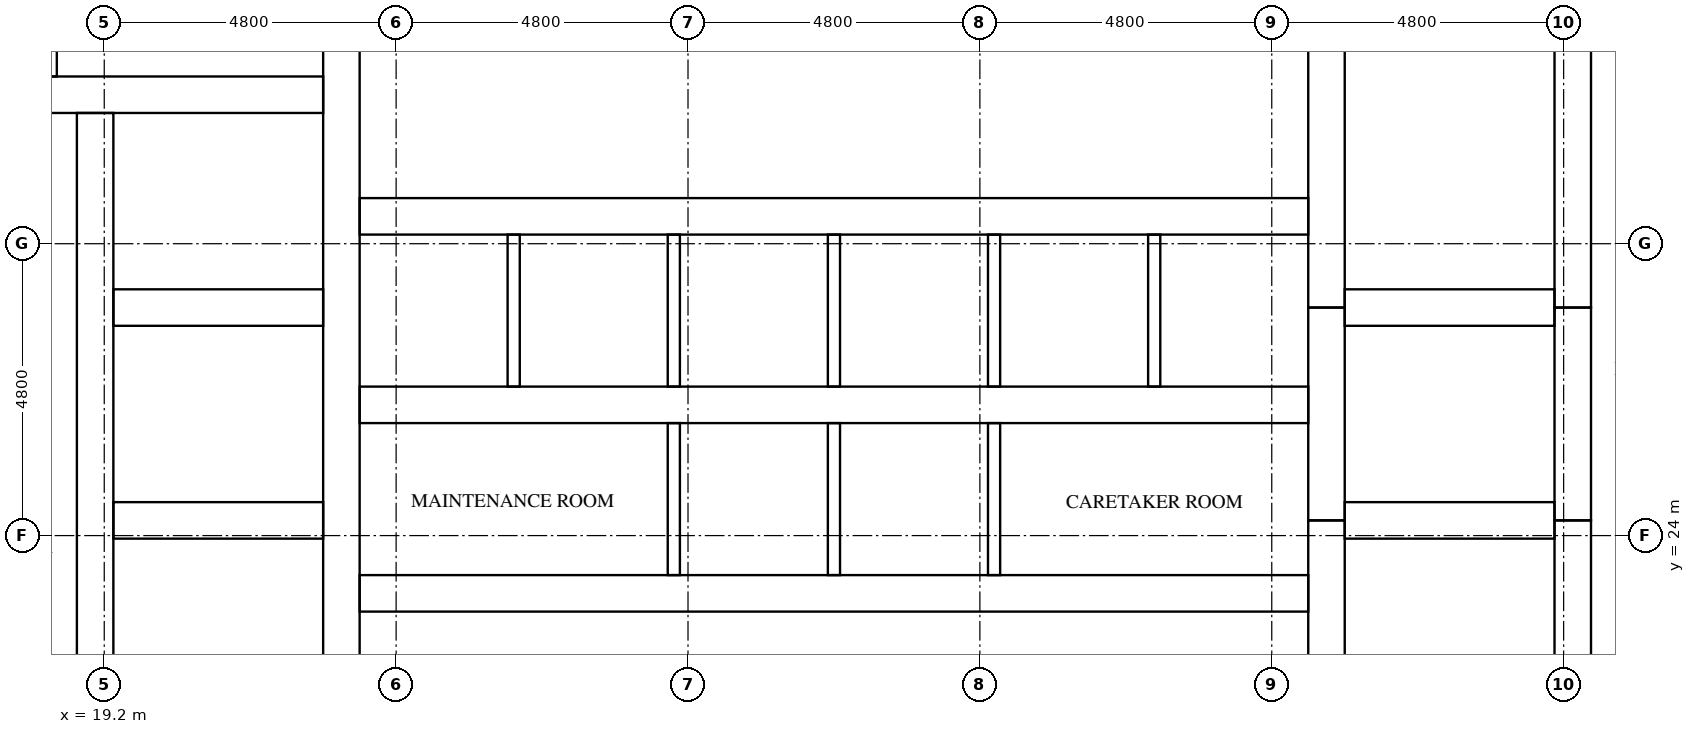
"""IFC4 building model, lengths in metres.
Left out: names, types, materials, properties, quantities, classifications, styles, units other than length and angle.
Written with IfcOpenShell. Run it as: python <this file> out.ifc"""

import sys

from ifc_helpers import new_model, si_unit, direction, frame, frame_2d, origin, place, context, subcontext, project, spatial, rectangle, extrude, element, fill, save


model = new_model("IFC4")
c1 = context("Model", 3, precision=1e-05, world=origin(), true_north=direction((0.0, 1.0)))
c2 = subcontext(c1, "Body", "Model", "MODEL_VIEW")
j1 = project(units=[si_unit("LENGTHUNIT", "METRE"), si_unit("PLANEANGLEUNIT", "RADIAN")], contexts=[c1])
p1 = place(None, origin())
s1 = spatial("IfcSite", under=j1, at=p1, CompositionType="ELEMENT")
p2 = place(p1, origin())
s2 = spatial("IfcBuilding", under=s1, at=p2, CompositionType="ELEMENT")
p3 = place(p2, frame((0.0, 0.0, 152.5)))
s3 = spatial("IfcBuildingStorey", under=s2, at=p3, CompositionType="ELEMENT", Elevation=152.5)
p4 = place(p3, frame((19.05, 15.8, 0.0), z_axis=(0.0, 0.0, 1.0), x_axis=(0.0, 1.0, 0.0)))
e1 = element("IfcWall", 1, at=p4, inside=s3, PredefinedType="SHEAR", context=c2, shape_type="SweptSolid", body=[
    extrude(rectangle(XDim=15.15, YDim=0.6, at=frame_2d((7.575, 0.0))), origin(), (0.0, 0.0, 1.0), 3.2),
])
p5 = place(p4, frame((9.65, 0.0, 0.0)))
e2 = element("IfcOpeningElement", 2, at=p5, cuts=e1, PredefinedType="OPENING", context=c2, shape_type="SweptSolid", body=[
    extrude(rectangle(XDim=1.1, YDim=2.1, at=frame_2d((0.55, 1.05))), frame((0.0, 0.31, 0.0), z_axis=(0.0, -1.0, 0.0), x_axis=(1.0, 0.0, 0.0)), (0.0, 0.0, 1.0), 0.62),
])
p6 = place(p4, frame((13.15, 0.0, 0.0)))
e3 = element("IfcOpeningElement", 3, at=p6, cuts=e1, PredefinedType="OPENING", context=c2, shape_type="SweptSolid", body=[
    extrude(rectangle(XDim=1.1, YDim=2.1, at=frame_2d((0.55, 1.05))), frame((0.0, 0.31, 0.0), z_axis=(0.0, -1.0, 0.0), x_axis=(1.0, 0.0, 0.0)), (0.0, 0.0, 1.0), 0.62),
])
p7 = place(p4, frame((0.4, 0.0, 0.0)))
e4 = element("IfcOpeningElement", 4, at=p7, cuts=e1, PredefinedType="OPENING", context=c2, shape_type="SweptSolid", body=[
    extrude(rectangle(XDim=1.2, YDim=2.1, at=frame_2d((0.6, 1.05))), frame((0.0, 0.31, 0.0), z_axis=(0.0, -1.0, 0.0), x_axis=(1.0, 0.0, 0.0)), (0.0, 0.0, 1.0), 0.62),
])
p8 = place(p3, frame((23.1, 15.8, 0.0), z_axis=(0.0, 0.0, 1.0), x_axis=(0.0, 1.0, 0.0)))
e5 = element("IfcWall", 5, at=p8, inside=s3, PredefinedType="SHEAR", context=c2, shape_type="SweptSolid", body=[
    extrude(rectangle(XDim=21.2, YDim=0.6, at=frame_2d((10.6, 0.0))), origin(), (0.0, 0.0, 1.0), 3.2),
])
p9 = place(p3, frame((39.3, 15.8, 0.0), z_axis=(0.0, 0.0, 1.0), x_axis=(0.0, 1.0, 0.0)))
e6 = element("IfcWall", 6, at=p9, inside=s3, PredefinedType="SHEAR", context=c2, shape_type="SweptSolid", body=[
    extrude(rectangle(XDim=8.45, YDim=0.6, at=frame_2d((4.225, 0.0))), origin(), (0.0, 0.0, 1.0), 3.2),
])
p10 = place(p3, frame((39.3, 24.25, 0.0), z_axis=(0.0, 0.0, 1.0), x_axis=(0.0, 1.0, 0.0)))
e7 = element("IfcWall", 7, at=p10, inside=s3, PredefinedType="SHEAR", context=c2, shape_type="SweptSolid", body=[
    extrude(rectangle(XDim=3.5, YDim=0.6, at=frame_2d((1.75, 0.0))), origin(), (0.0, 0.0, 1.0), 3.2),
])
p11 = place(p3, frame((39.3, 27.75, 0.0), z_axis=(0.0, 0.0, 1.0), x_axis=(0.0, 1.0, 0.0)))
e8 = element("IfcWall", 8, at=p11, inside=s3, PredefinedType="SHEAR", context=c2, shape_type="SweptSolid", body=[
    extrude(rectangle(XDim=9.25, YDim=0.6, at=frame_2d((4.625, 0.0))), origin(), (0.0, 0.0, 1.0), 3.2),
])
p12 = place(p3, frame((43.35, 15.8, 0.0), z_axis=(0.0, 0.0, 1.0), x_axis=(0.0, 1.0, 0.0)))
e9 = element("IfcWall", 9, at=p12, inside=s3, PredefinedType="SHEAR", context=c2, shape_type="SweptSolid", body=[
    extrude(rectangle(XDim=8.45, YDim=0.6, at=frame_2d((4.225, 0.0))), origin(), (0.0, 0.0, 1.0), 3.2),
])
p13 = place(p12, frame((0.4, 0.0, 0.0)))
e10 = element("IfcOpeningElement", 10, at=p13, cuts=e9, PredefinedType="OPENING", context=c2, shape_type="SweptSolid", body=[
    extrude(rectangle(XDim=1.2, YDim=2.1, at=frame_2d((0.6, 1.05))), frame((0.0, 0.31, 0.0), z_axis=(0.0, -1.0, 0.0), x_axis=(1.0, 0.0, 0.0)), (0.0, 0.0, 1.0), 0.62),
])
p14 = place(p3, frame((43.35, 24.25, 0.0), z_axis=(0.0, 0.0, 1.0), x_axis=(0.0, 1.0, 0.0)))
e11 = element("IfcWall", 11, at=p14, inside=s3, PredefinedType="SHEAR", context=c2, shape_type="SweptSolid", body=[
    extrude(rectangle(XDim=3.5, YDim=0.6, at=frame_2d((1.75, 0.0))), origin(), (0.0, 0.0, 1.0), 3.2),
])
p15 = place(p14, frame((1.2, 0.0, 0.0)))
e12 = element("IfcOpeningElement", 12, at=p15, cuts=e11, PredefinedType="OPENING", context=c2, shape_type="SweptSolid", body=[
    extrude(rectangle(XDim=1.1, YDim=2.1, at=frame_2d((0.55, 1.05))), frame((0.0, 0.31, 0.0), z_axis=(0.0, -1.0, 0.0), x_axis=(1.0, 0.0, 0.0)), (0.0, 0.0, 1.0), 0.62),
])
p16 = place(p3, frame((43.35, 27.75, 0.0), z_axis=(0.0, 0.0, 1.0), x_axis=(0.0, 1.0, 0.0)))
e13 = element("IfcWall", 13, at=p16, inside=s3, PredefinedType="SHEAR", context=c2, shape_type="SweptSolid", body=[
    extrude(rectangle(XDim=9.25, YDim=0.6, at=frame_2d((4.625, 0.0))), origin(), (0.0, 0.0, 1.0), 3.2),
])
p17 = place(p16, frame((7.65, 0.0, 0.0)))
e14 = element("IfcOpeningElement", 14, at=p17, cuts=e13, PredefinedType="OPENING", context=c2, shape_type="SweptSolid", body=[
    extrude(rectangle(XDim=1.2, YDim=2.1, at=frame_2d((0.6, 1.05))), frame((0.0, 0.31, 0.0), z_axis=(0.0, -1.0, 0.0), x_axis=(1.0, 0.0, 0.0)), (0.0, 0.0, 1.0), 0.62),
])
for number, where, z_axis, x_axis in (
    (15, (19.35, 24.25, 0.0), (0.0, 0.0, 1.0), (1.0, 0.0, 0.0)),
    (16, (19.35, 27.75, 0.0), (0.0, 0.0, 1.0), (1.0, 0.0, 0.0)),
):
    element("IfcWall", number, at=place(p3, frame(where, z_axis=z_axis, x_axis=x_axis)), inside=s3, PredefinedType="SHEAR", context=c2, shape_type="SweptSolid", body=[
        extrude(rectangle(XDim=3.45, YDim=0.6, at=frame_2d((1.725, 0.0))), origin(), (0.0, 0.0, 1.0), 3.2),
    ])
p18 = place(p3, frame((15.8, 31.25, 0.0), z_axis=(0.0, 0.0, 1.0), x_axis=(1.0, 0.0, 0.0)))
e17 = element("IfcWall", 17, at=p18, inside=s3, PredefinedType="SHEAR", context=c2, shape_type="SweptSolid", body=[
    extrude(rectangle(XDim=7.0, YDim=0.6, at=frame_2d((3.5, 0.0))), origin(), (0.0, 0.0, 1.0), 3.2),
])
for number, where, z_axis, x_axis in (
    (18, (39.6, 24.25, 0.0), (0.0, 0.0, 1.0), (1.0, 0.0, 0.0)),
    (19, (39.6, 27.75, 0.0), (0.0, 0.0, 1.0), (1.0, 0.0, 0.0)),
):
    element("IfcWall", number, at=place(p3, frame(where, z_axis=z_axis, x_axis=x_axis)), inside=s3, PredefinedType="SHEAR", context=c2, shape_type="SweptSolid", body=[
        extrude(rectangle(XDim=3.45, YDim=0.6, at=frame_2d((1.725, 0.0))), origin(), (0.0, 0.0, 1.0), 3.2),
    ])
p19 = place(p3, frame((23.4, 23.05, 0.0), z_axis=(0.0, 0.0, 1.0), x_axis=(1.0, 0.0, 0.0)))
e20 = element("IfcWall", 20, at=p19, inside=s3, PredefinedType="SHEAR", context=c2, shape_type="SweptSolid", body=[
    extrude(rectangle(XDim=15.6, YDim=0.6, at=frame_2d((7.8, 0.0))), origin(), (0.0, 0.0, 1.0), 3.2),
])
p20 = place(p19, frame((2.033, 0.0, 0.0)))
e21 = element("IfcOpeningElement", 21, at=p20, cuts=e20, PredefinedType="OPENING", context=c2, shape_type="SweptSolid", body=[
    extrude(rectangle(XDim=1.0, YDim=2.1, at=frame_2d((0.5, 1.05))), frame((0.0, 0.31, 0.0), z_axis=(0.0, -1.0, 0.0), x_axis=(1.0, 0.0, 0.0)), (0.0, 0.0, 1.0), 0.62),
])
p21 = place(p19, frame((12.567, 0.0, 0.0)))
e22 = element("IfcOpeningElement", 22, at=p21, cuts=e20, PredefinedType="OPENING", context=c2, shape_type="SweptSolid", body=[
    extrude(rectangle(XDim=1.0, YDim=2.1, at=frame_2d((0.5, 1.05))), frame((0.0, 0.31, 0.0), z_axis=(0.0, -1.0, 0.0), x_axis=(1.0, 0.0, 0.0)), (0.0, 0.0, 1.0), 0.62),
])
p22 = place(p3, frame((23.4, 26.15, 0.0), z_axis=(0.0, 0.0, 1.0), x_axis=(1.0, 0.0, 0.0)))
e23 = element("IfcWall", 23, at=p22, inside=s3, PredefinedType="SHEAR", context=c2, shape_type="SweptSolid", body=[
    extrude(rectangle(XDim=15.6, YDim=0.6, at=frame_2d((7.8, 0.0))), origin(), (0.0, 0.0, 1.0), 3.2),
])
p23 = place(p3, frame((23.4, 29.25, 0.0), z_axis=(0.0, 0.0, 1.0), x_axis=(1.0, 0.0, 0.0)))
e24 = element("IfcWall", 24, at=p23, inside=s3, PredefinedType="SHEAR", context=c2, shape_type="SweptSolid", body=[
    extrude(rectangle(XDim=15.6, YDim=0.6, at=frame_2d((7.8, 0.0))), origin(), (0.0, 0.0, 1.0), 3.2),
])
p24 = place(p23, frame((0.667, 0.0, 0.0)))
e25 = element("IfcOpeningElement", 25, at=p24, cuts=e24, PredefinedType="OPENING", context=c2, shape_type="SweptSolid", body=[
    extrude(rectangle(XDim=1.1, YDim=2.1, at=frame_2d((0.55, 1.05))), frame((0.0, 0.31, 0.0), z_axis=(0.0, -1.0, 0.0), x_axis=(1.0, 0.0, 0.0)), (0.0, 0.0, 1.0), 0.62),
])
p25 = place(p23, frame((3.3, 0.0, 0.0)))
e26 = element("IfcOpeningElement", 26, at=p25, cuts=e24, PredefinedType="OPENING", context=c2, shape_type="SweptSolid", body=[
    extrude(rectangle(XDim=1.1, YDim=2.1, at=frame_2d((0.55, 1.05))), frame((0.0, 0.31, 0.0), z_axis=(0.0, -1.0, 0.0), x_axis=(1.0, 0.0, 0.0)), (0.0, 0.0, 1.0), 0.62),
])
p26 = place(p23, frame((5.933, 0.0, 0.0)))
e27 = element("IfcOpeningElement", 27, at=p26, cuts=e24, PredefinedType="OPENING", context=c2, shape_type="SweptSolid", body=[
    extrude(rectangle(XDim=1.1, YDim=2.1, at=frame_2d((0.55, 1.05))), frame((0.0, 0.31, 0.0), z_axis=(0.0, -1.0, 0.0), x_axis=(1.0, 0.0, 0.0)), (0.0, 0.0, 1.0), 0.62),
])
p27 = place(p23, frame((8.567, 0.0, 0.0)))
e28 = element("IfcOpeningElement", 28, at=p27, cuts=e24, PredefinedType="OPENING", context=c2, shape_type="SweptSolid", body=[
    extrude(rectangle(XDim=1.1, YDim=2.1, at=frame_2d((0.55, 1.05))), frame((0.0, 0.31, 0.0), z_axis=(0.0, -1.0, 0.0), x_axis=(1.0, 0.0, 0.0)), (0.0, 0.0, 1.0), 0.62),
])
p28 = place(p23, frame((11.2, 0.0, 0.0)))
e29 = element("IfcOpeningElement", 29, at=p28, cuts=e24, PredefinedType="OPENING", context=c2, shape_type="SweptSolid", body=[
    extrude(rectangle(XDim=1.1, YDim=2.1, at=frame_2d((0.55, 1.05))), frame((0.0, 0.31, 0.0), z_axis=(0.0, -1.0, 0.0), x_axis=(1.0, 0.0, 0.0)), (0.0, 0.0, 1.0), 0.62),
])
p29 = place(p23, frame((13.833, 0.0, 0.0)))
e30 = element("IfcOpeningElement", 30, at=p29, cuts=e24, PredefinedType="OPENING", context=c2, shape_type="SweptSolid", body=[
    extrude(rectangle(XDim=1.1, YDim=2.1, at=frame_2d((0.55, 1.05))), frame((0.0, 0.31, 0.0), z_axis=(0.0, -1.0, 0.0), x_axis=(1.0, 0.0, 0.0)), (0.0, 0.0, 1.0), 0.62),
])
for number, where, z_axis, x_axis in (
    (31, (25.933, 26.45, 0.0), (0.0, 0.0, 1.0), (0.0, 1.0, 0.0)),
    (32, (28.567, 23.35, 0.0), (0.0, 0.0, 1.0), (0.0, 1.0, 0.0)),
    (33, (28.567, 26.45, 0.0), (0.0, 0.0, 1.0), (0.0, 1.0, 0.0)),
    (34, (31.2, 23.35, 0.0), (0.0, 0.0, 1.0), (0.0, 1.0, 0.0)),
    (35, (31.2, 26.45, 0.0), (0.0, 0.0, 1.0), (0.0, 1.0, 0.0)),
    (36, (33.833, 23.35, 0.0), (0.0, 0.0, 1.0), (0.0, 1.0, 0.0)),
    (37, (33.833, 26.45, 0.0), (0.0, 0.0, 1.0), (0.0, 1.0, 0.0)),
    (38, (36.467, 26.45, 0.0), (0.0, 0.0, 1.0), (0.0, 1.0, 0.0)),
):
    element("IfcWall", number, at=place(p3, frame(where, z_axis=z_axis, x_axis=x_axis)), inside=s3, PredefinedType="SOLIDWALL", context=c2, shape_type="SweptSolid", body=[
        extrude(rectangle(XDim=2.5, YDim=0.2, at=frame_2d((1.25, 0.0))), origin(), (0.0, 0.0, 1.0), 3.2),
    ])
p30 = place(p3, frame((18.32, 31.55, 0.0), z_axis=(0.0, 0.0, 1.0), x_axis=(0.0, 1.0, 0.0)))
e39 = element("IfcWall", 39, at=p30, inside=s3, PredefinedType="PARTITIONING", context=c2, shape_type="SweptSolid", body=[
    extrude(rectangle(XDim=5.45, YDim=0.2, at=frame_2d((2.725, 0.0))), origin(), (0.0, 0.0, 1.0), 3.2),
])
p31 = place(p24, origin())
e40 = element("IfcDoor", 40, at=p31, inside=s3, OperationType="DOUBLE_DOOR_SLIDING", PredefinedType="DOOR", context=c2, shape_type="SweptSolid", body=[
    extrude(rectangle(XDim=1.1, YDim=2.1, at=frame_2d((0.55, 1.05))), frame((0.0, 0.025, 0.0), z_axis=(0.0, -1.0, 0.0), x_axis=(1.0, 0.0, 0.0)), (0.0, 0.0, 1.0), 0.05),
])
fill(e25, e40)
p32 = place(p25, origin())
e41 = element("IfcDoor", 41, at=p32, inside=s3, OperationType="DOUBLE_DOOR_SLIDING", PredefinedType="DOOR", context=c2, shape_type="SweptSolid", body=[
    extrude(rectangle(XDim=1.1, YDim=2.1, at=frame_2d((0.55, 1.05))), frame((0.0, 0.025, 0.0), z_axis=(0.0, -1.0, 0.0), x_axis=(1.0, 0.0, 0.0)), (0.0, 0.0, 1.0), 0.05),
])
fill(e26, e41)
p33 = place(p26, origin())
e42 = element("IfcDoor", 42, at=p33, inside=s3, OperationType="DOUBLE_DOOR_SLIDING", PredefinedType="DOOR", context=c2, shape_type="SweptSolid", body=[
    extrude(rectangle(XDim=1.1, YDim=2.1, at=frame_2d((0.55, 1.05))), frame((0.0, 0.025, 0.0), z_axis=(0.0, -1.0, 0.0), x_axis=(1.0, 0.0, 0.0)), (0.0, 0.0, 1.0), 0.05),
])
fill(e27, e42)
p34 = place(p27, origin())
e43 = element("IfcDoor", 43, at=p34, inside=s3, OperationType="DOUBLE_DOOR_SLIDING", PredefinedType="DOOR", context=c2, shape_type="SweptSolid", body=[
    extrude(rectangle(XDim=1.1, YDim=2.1, at=frame_2d((0.55, 1.05))), frame((0.0, 0.025, 0.0), z_axis=(0.0, -1.0, 0.0), x_axis=(1.0, 0.0, 0.0)), (0.0, 0.0, 1.0), 0.05),
])
fill(e28, e43)
p35 = place(p28, origin())
e44 = element("IfcDoor", 44, at=p35, inside=s3, OperationType="DOUBLE_DOOR_SLIDING", PredefinedType="DOOR", context=c2, shape_type="SweptSolid", body=[
    extrude(rectangle(XDim=1.1, YDim=2.1, at=frame_2d((0.55, 1.05))), frame((0.0, 0.025, 0.0), z_axis=(0.0, -1.0, 0.0), x_axis=(1.0, 0.0, 0.0)), (0.0, 0.0, 1.0), 0.05),
])
fill(e29, e44)
p36 = place(p29, origin())
e45 = element("IfcDoor", 45, at=p36, inside=s3, OperationType="DOUBLE_DOOR_SLIDING", PredefinedType="DOOR", context=c2, shape_type="SweptSolid", body=[
    extrude(rectangle(XDim=1.1, YDim=2.1, at=frame_2d((0.55, 1.05))), frame((0.0, 0.025, 0.0), z_axis=(0.0, -1.0, 0.0), x_axis=(1.0, 0.0, 0.0)), (0.0, 0.0, 1.0), 0.05),
])
fill(e30, e45)
p37 = place(p5, origin())
e46 = element("IfcDoor", 46, at=p37, inside=s3, OperationType="DOUBLE_DOOR_SLIDING", PredefinedType="DOOR", context=c2, shape_type="SweptSolid", body=[
    extrude(rectangle(XDim=1.1, YDim=2.1, at=frame_2d((0.55, 1.05))), frame((0.0, 0.025, 0.0), z_axis=(0.0, -1.0, 0.0), x_axis=(1.0, 0.0, 0.0)), (0.0, 0.0, 1.0), 0.05),
])
fill(e2, e46)
p38 = place(p6, origin())
e47 = element("IfcDoor", 47, at=p38, inside=s3, OperationType="DOUBLE_DOOR_SLIDING", PredefinedType="DOOR", context=c2, shape_type="SweptSolid", body=[
    extrude(rectangle(XDim=1.1, YDim=2.1, at=frame_2d((0.55, 1.05))), frame((0.0, 0.025, 0.0), z_axis=(0.0, -1.0, 0.0), x_axis=(1.0, 0.0, 0.0)), (0.0, 0.0, 1.0), 0.05),
])
fill(e3, e47)
p39 = place(p15, origin())
e48 = element("IfcDoor", 48, at=p39, inside=s3, OperationType="DOUBLE_DOOR_SLIDING", PredefinedType="DOOR", context=c2, shape_type="SweptSolid", body=[
    extrude(rectangle(XDim=1.1, YDim=2.1, at=frame_2d((0.55, 1.05))), frame((0.0, 0.025, 0.0), z_axis=(0.0, -1.0, 0.0), x_axis=(1.0, 0.0, 0.0)), (0.0, 0.0, 1.0), 0.05),
])
fill(e12, e48)
p40 = place(p20, frame((1.0, 0.0, 0.0), z_axis=(0.0, 0.0, 1.0), x_axis=(-1.0, 0.0, 0.0)))
e49 = element("IfcDoor", 49, at=p40, inside=s3, OperationType="SINGLE_SWING_RIGHT", PredefinedType="DOOR", context=c2, shape_type="SweptSolid", body=[
    extrude(rectangle(XDim=1.0, YDim=2.1, at=frame_2d((0.5, 1.05))), frame((0.0, 0.025, 0.0), z_axis=(0.0, -1.0, 0.0), x_axis=(1.0, 0.0, 0.0)), (0.0, 0.0, 1.0), 0.05),
])
fill(e21, e49)
p41 = place(p21, frame((1.0, 0.0, 0.0), z_axis=(0.0, 0.0, 1.0), x_axis=(-1.0, 0.0, 0.0)))
e50 = element("IfcDoor", 50, at=p41, inside=s3, OperationType="SINGLE_SWING_LEFT", PredefinedType="DOOR", context=c2, shape_type="SweptSolid", body=[
    extrude(rectangle(XDim=1.0, YDim=2.1, at=frame_2d((0.5, 1.05))), frame((0.0, 0.025, 0.0), z_axis=(0.0, -1.0, 0.0), x_axis=(1.0, 0.0, 0.0)), (0.0, 0.0, 1.0), 0.05),
])
fill(e22, e50)
save(model, sys.argv[1])
